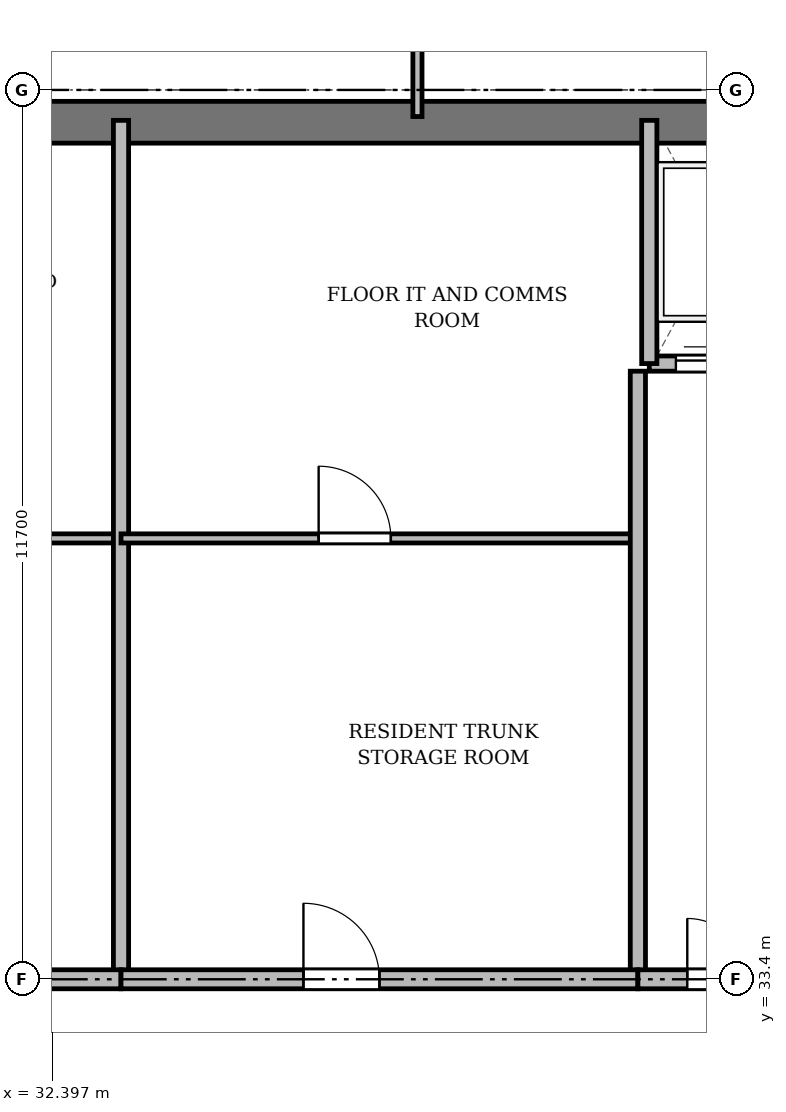
"""IFC4 building model, lengths in metres.
Left out: names, types, materials, properties, quantities, classifications, styles, units other than length and angle.
Written with IfcOpenShell. Run it as: python <this file> out.ifc"""

import sys

from ifc_helpers import new_model, si_unit, direction, frame, frame_2d, origin, place, context, subcontext, project, spatial, rectangle, extrude, source, transform, mapped, element, fill, save


model = new_model("IFC4")
c1 = context("Model", 3, precision=1e-05, world=origin(), true_north=direction((0.0, 1.0)))
c2 = subcontext(c1, "Body", "Model", "MODEL_VIEW")
j1 = project(units=[si_unit("LENGTHUNIT", "METRE"), si_unit("PLANEANGLEUNIT", "RADIAN")], contexts=[c1])
p1 = place(None, origin())
s1 = spatial("IfcSite", under=j1, at=p1, CompositionType="ELEMENT")
p2 = place(p1, origin())
s2 = spatial("IfcBuilding", under=s1, at=p2, CompositionType="ELEMENT")
p3 = place(p2, frame((0.0, 0.0, 255.9)))
s3 = spatial("IfcBuildingStorey", under=s2, at=p3, CompositionType="ELEMENT", Elevation=255.9)
p4 = place(p3, frame((15.65, 44.675, 0.0), z_axis=(0.0, 0.0, 1.0), x_axis=(1.0, 0.0, 0.0)))
e1 = element("IfcWall", 1, at=p4, inside=s3, PredefinedType="SHEAR", context=c2, shape_type="SweptSolid", body=[
    extrude(rectangle(XDim=43.1, YDim=0.55, at=frame_2d((21.55, 0.0))), origin(), (0.0, 0.0, 1.0), 3.37),
])
p5 = place(p3, frame((26.3, 39.2, 0.0), z_axis=(0.0, 0.0, 1.0), x_axis=(1.0, 0.0, 0.0)))
e2 = element("IfcWall", 2, at=p5, inside=s3, PredefinedType="PARTITIONING", context=c2, shape_type="SweptSolid", body=[
    extrude(rectangle(XDim=7.0, YDim=0.12, at=frame_2d((3.5, 0.0))), origin(), (0.0, 0.0, 1.0), 2.87),
])
p6 = place(p5, frame((2.6, 0.0, 0.0)))
e3 = element("IfcOpeningElement", 3, at=p6, cuts=e2, PredefinedType="OPENING", context=c2, shape_type="SweptSolid", body=[
    extrude(rectangle(XDim=0.95, YDim=2.15, at=frame_2d((0.475, 1.075))), frame((0.0, 0.07, 0.0), z_axis=(0.0, -1.0, 0.0), x_axis=(1.0, 0.0, 0.0)), (0.0, 0.0, 1.0), 0.14),
])
p7 = place(p3, frame((33.3, 33.4, 0.0), z_axis=(0.0, 0.0, 1.0), x_axis=(0.0, 1.0, 0.0)))
e4 = element("IfcWall", 4, at=p7, inside=s3, PredefinedType="SOLIDWALL", context=c2, shape_type="SweptSolid", body=[
    extrude(rectangle(XDim=11.3, YDim=0.2, at=frame_2d((5.65, 0.0))), origin(), (0.0, 0.0, 1.0), 2.92),
])
p8 = place(p3, frame((33.3, 39.2, 0.0), z_axis=(0.0, 0.0, 1.0), x_axis=(1.0, 0.0, 0.0)))
e5 = element("IfcWall", 5, at=p8, inside=s3, PredefinedType="PARTITIONING", context=c2, shape_type="SweptSolid", body=[
    extrude(rectangle(XDim=6.8, YDim=0.12, at=frame_2d((3.4, 0.0))), origin(), (0.0, 0.0, 1.0), 3.37),
])
p9 = place(p8, frame((2.6, 0.0, 0.0)))
e6 = element("IfcOpeningElement", 6, at=p9, cuts=e5, PredefinedType="OPENING", context=c2, shape_type="SweptSolid", body=[
    extrude(rectangle(XDim=0.95, YDim=2.15, at=frame_2d((0.475, 1.075))), frame((0.0, 0.07, 0.0), z_axis=(0.0, -1.0, 0.0), x_axis=(1.0, 0.0, 0.0)), (0.0, 0.0, 1.0), 0.14),
])
p10 = place(p3, frame((40.1, 33.4, 0.0), z_axis=(0.0, 0.0, 1.0), x_axis=(0.0, 1.0, 0.0)))
e7 = element("IfcWall", 7, at=p10, inside=s3, PredefinedType="SOLIDWALL", context=c2, shape_type="SweptSolid", body=[
    extrude(rectangle(XDim=8.0, YDim=0.2, at=frame_2d((4.0, 0.0))), origin(), (0.0, 0.0, 1.0), 2.92),
])
p11 = place(p3, frame((40.25, 41.5, 0.0), z_axis=(0.0, 0.0, 1.0), x_axis=(1.0, 0.0, 0.0)))
e8 = element("IfcWall", 8, at=p11, inside=s3, PredefinedType="SOLIDWALL", context=c2, shape_type="SweptSolid", body=[
    extrude(rectangle(XDim=6.9, YDim=0.2, at=frame_2d((3.45, 0.0))), origin(), (0.0, 0.0, 1.0), 3.37),
])
p12 = place(p11, frame((0.35, 0.0, 0.0)))
e9 = element("IfcOpeningElement", 9, at=p12, cuts=e8, PredefinedType="OPENING", context=c2, shape_type="SweptSolid", body=[
    extrude(rectangle(XDim=1.05, YDim=2.15, at=frame_2d((0.525, 1.075))), frame((0.0, 0.11, 0.0), z_axis=(0.0, -1.0, 0.0), x_axis=(1.0, 0.0, 0.0)), (0.0, 0.0, 1.0), 0.22),
])
p13 = place(p11, frame((2.05, 0.0, 0.0)))
e10 = element("IfcOpeningElement", 10, at=p13, cuts=e8, PredefinedType="OPENING", context=c2, shape_type="SweptSolid", body=[
    extrude(rectangle(XDim=1.05, YDim=2.15, at=frame_2d((0.525, 1.075))), frame((0.0, 0.11, 0.0), z_axis=(0.0, -1.0, 0.0), x_axis=(1.0, 0.0, 0.0)), (0.0, 0.0, 1.0), 0.22),
])
p14 = place(p11, frame((3.75, 0.0, 0.0)))
e11 = element("IfcOpeningElement", 11, at=p14, cuts=e8, PredefinedType="OPENING", context=c2, shape_type="SweptSolid", body=[
    extrude(rectangle(XDim=1.05, YDim=2.15, at=frame_2d((0.525, 1.075))), frame((0.0, 0.11, 0.0), z_axis=(0.0, -1.0, 0.0), x_axis=(1.0, 0.0, 0.0)), (0.0, 0.0, 1.0), 0.22),
])
p15 = place(p11, frame((5.45, 0.0, 0.0)))
e12 = element("IfcOpeningElement", 12, at=p15, cuts=e8, PredefinedType="OPENING", context=c2, shape_type="SweptSolid", body=[
    extrude(rectangle(XDim=1.05, YDim=2.15, at=frame_2d((0.525, 1.075))), frame((0.0, 0.11, 0.0), z_axis=(0.0, -1.0, 0.0), x_axis=(1.0, 0.0, 0.0)), (0.0, 0.0, 1.0), 0.22),
])
p16 = place(p3, frame((40.25, 41.5, 0.0), z_axis=(0.0, 0.0, 1.0), x_axis=(0.0, 1.0, 0.0)))
e13 = element("IfcWall", 13, at=p16, inside=s3, PredefinedType="SOLIDWALL", context=c2, shape_type="SweptSolid", body=[
    extrude(rectangle(XDim=3.2, YDim=0.2, at=frame_2d((1.6, 0.0))), origin(), (0.0, 0.0, 1.0), 3.37),
])
p17 = place(p3, frame((26.3, 33.4, 0.0), z_axis=(0.0, 0.0, 1.0), x_axis=(1.0, 0.0, 0.0)))
e14 = element("IfcWall", 14, at=p17, inside=s3, PredefinedType="PARTITIONING", context=c2, shape_type="SweptSolid", body=[
    extrude(rectangle(XDim=7.0, YDim=0.25, at=frame_2d((3.5, 0.0))), origin(), (0.0, 0.0, 1.0), 2.92),
])
p18 = place(p17, frame((1.35, 0.0, 0.0)))
e15 = element("IfcOpeningElement", 15, at=p18, cuts=e14, PredefinedType="OPENING", context=c2, shape_type="SweptSolid", body=[
    extrude(rectangle(XDim=0.95, YDim=2.15, at=frame_2d((0.475, 1.075))), frame((0.0, 0.135, 0.0), z_axis=(0.0, -1.0, 0.0), x_axis=(1.0, 0.0, 0.0)), (0.0, 0.0, 1.0), 0.27),
])
p19 = place(p3, frame((33.3, 33.4, 0.0), z_axis=(0.0, 0.0, 1.0), x_axis=(1.0, 0.0, 0.0)))
e16 = element("IfcWall", 16, at=p19, inside=s3, PredefinedType="PARTITIONING", context=c2, shape_type="SweptSolid", body=[
    extrude(rectangle(XDim=6.8, YDim=0.25, at=frame_2d((3.4, 0.0))), origin(), (0.0, 0.0, 1.0), 2.92),
])
p20 = place(p19, frame((2.4, 0.0, 0.0)))
e17 = element("IfcOpeningElement", 17, at=p20, cuts=e16, PredefinedType="OPENING", context=c2, shape_type="SweptSolid", body=[
    extrude(rectangle(XDim=1.0, YDim=2.15, at=frame_2d((0.5, 1.075))), frame((0.0, 0.135, 0.0), z_axis=(0.0, -1.0, 0.0), x_axis=(1.0, 0.0, 0.0)), (0.0, 0.0, 1.0), 0.27),
])
p21 = place(p3, frame((40.1, 33.4, 0.0), z_axis=(0.0, 0.0, 1.0), x_axis=(1.0, 0.0, 0.0)))
e18 = element("IfcWall", 18, at=p21, inside=s3, PredefinedType="PARTITIONING", context=c2, shape_type="SweptSolid", body=[
    extrude(rectangle(XDim=7.05, YDim=0.25, at=frame_2d((3.525, 0.0))), origin(), (0.0, 0.0, 1.0), 2.92),
])
p22 = place(p21, frame((0.65, 0.0, 0.0)))
e19 = element("IfcOpeningElement", 19, at=p22, cuts=e18, PredefinedType="OPENING", context=c2, shape_type="SweptSolid", body=[
    extrude(rectangle(XDim=1.6, YDim=2.2, at=frame_2d((0.8, 1.1))), frame((0.0, 0.135, 0.0), z_axis=(0.0, -1.0, 0.0), x_axis=(1.0, 0.0, 0.0)), (0.0, 0.0, 1.0), 0.27),
])
p23 = place(p3, frame((37.2, 44.75, 0.0), z_axis=(0.0, 0.0, 1.0), x_axis=(0.0, 1.0, 0.0)))
e20 = element("IfcWall", 20, at=p23, inside=s3, PredefinedType="PARTITIONING", context=c2, shape_type="SweptSolid", body=[
    extrude(rectangle(XDim=3.61, YDim=0.12, at=frame_2d((1.805, 0.0))), origin(), (0.0, 0.0, 1.0), 2.92),
])
p24 = place(p23, frame((1.1, 0.0, 0.0)))
e21 = element("IfcOpeningElement", 21, at=p24, cuts=e20, PredefinedType="OPENING", context=c2, shape_type="SweptSolid", body=[
    extrude(rectangle(XDim=0.95, YDim=2.15, at=frame_2d((0.475, 1.075))), frame((0.0, 0.07, 0.0), z_axis=(0.0, -1.0, 0.0), x_axis=(1.0, 0.0, 0.0)), (0.0, 0.0, 1.0), 0.14),
])
m1 = source(origin(), c2, "Body", "SweptSolid", [
    extrude(rectangle(XDim=0.95, YDim=2.15, at=frame_2d((0.475, 1.075))), frame((0.0, 0.025, 0.0), z_axis=(0.0, -1.0, 0.0), x_axis=(1.0, 0.0, 0.0)), (0.0, 0.0, 1.0), 0.05),
])
p25 = place(p9, origin())
e22 = element("IfcDoor", 22, at=p25, inside=s3, OperationType="SINGLE_SWING_LEFT", PredefinedType="DOOR", context=c2, shape_type="MappedRepresentation", body=[
    mapped(m1, transform((0.0, 0.0, 0.0), x_axis=(1.0, 0.0, 0.0), y_axis=(0.0, 1.0, 0.0), z_axis=(0.0, 0.0, 1.0), scale=1.0)),
])
fill(e6, e22)
m2 = source(origin(), c2, "Body", "SweptSolid", [
    extrude(rectangle(XDim=1.05, YDim=2.15, at=frame_2d((0.525, 1.075))), frame((0.0, 0.025, 0.0), z_axis=(0.0, -1.0, 0.0), x_axis=(1.0, 0.0, 0.0)), (0.0, 0.0, 1.0), 0.05),
])
p26 = place(p12, origin())
e23 = element("IfcDoor", 23, at=p26, inside=s3, OperationType="DOUBLE_DOOR_SLIDING", PredefinedType="DOOR", context=c2, shape_type="MappedRepresentation", body=[
    mapped(m2, transform((0.0, 0.0, 0.0), x_axis=(1.0, 0.0, 0.0), y_axis=(0.0, 1.0, 0.0), z_axis=(0.0, 0.0, 1.0), scale=1.0)),
])
fill(e9, e23)
m3 = source(origin(), c2, "Body", "SweptSolid", [
    extrude(rectangle(XDim=1.0, YDim=2.15, at=frame_2d((0.5, 1.075))), frame((0.0, 0.025, 0.0), z_axis=(0.0, -1.0, 0.0), x_axis=(1.0, 0.0, 0.0)), (0.0, 0.0, 1.0), 0.05),
])
p27 = place(p20, origin())
e24 = element("IfcDoor", 24, at=p27, inside=s3, OperationType="SINGLE_SWING_LEFT", PredefinedType="DOOR", context=c2, shape_type="MappedRepresentation", body=[
    mapped(m3, transform((0.0, 0.0, 0.0), x_axis=(1.0, 0.0, 0.0), y_axis=(0.0, 1.0, 0.0), z_axis=(0.0, 0.0, 1.0), scale=1.0)),
])
fill(e17, e24)
m4 = source(origin(), c2, "Body", "SweptSolid", [
    extrude(rectangle(XDim=1.6, YDim=2.2, at=frame_2d((0.8, 1.1))), frame((0.0, 0.025, 0.0), z_axis=(0.0, -1.0, 0.0), x_axis=(1.0, 0.0, 0.0)), (0.0, 0.0, 1.0), 0.05),
])
p28 = place(p22, origin())
e25 = element("IfcDoor", 25, at=p28, inside=s3, OperationType="DOUBLE_DOOR_SINGLE_SWING", PredefinedType="DOOR", context=c2, shape_type="MappedRepresentation", body=[
    mapped(m4, transform((0.0, 0.0, 0.0), x_axis=(1.0, 0.0, 0.0), y_axis=(0.0, 1.0, 0.0), z_axis=(0.0, 0.0, 1.0), scale=1.0)),
])
fill(e19, e25)
save(model, sys.argv[1])
